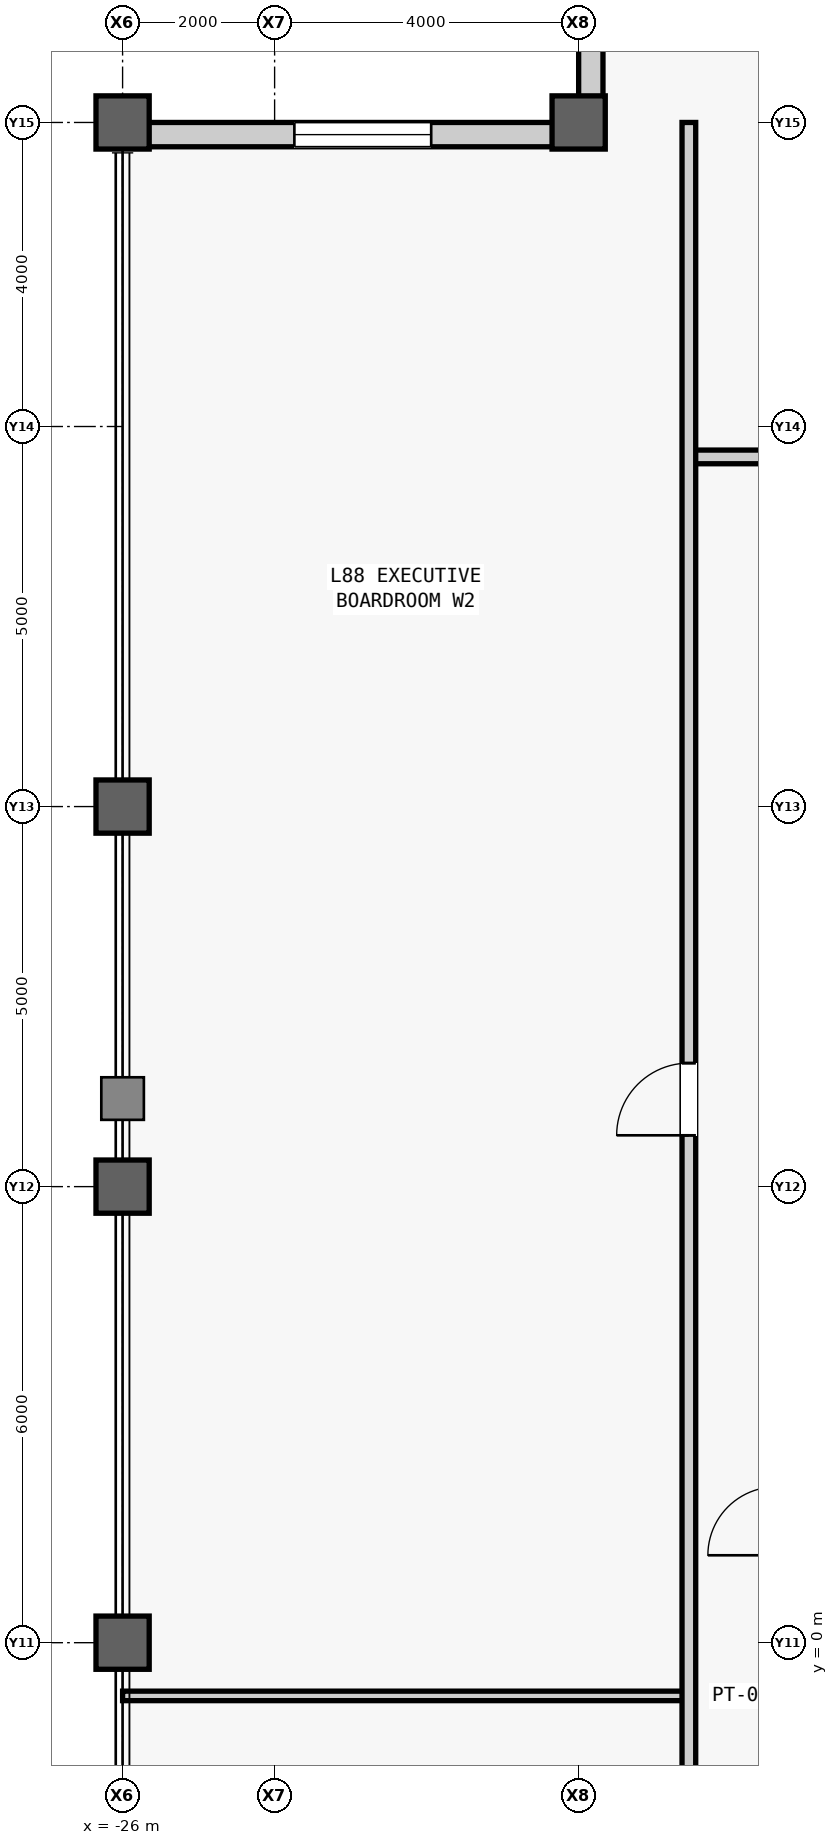
"""IFC4 building model, lengths in metres.
Left out: names, types, materials, properties, quantities, classifications, styles, units other than length and angle.
Written with IfcOpenShell. Run it as: python <this file> out.ifc"""

import sys

from ifc_helpers import new_model, si_unit, direction, frame, frame_2d, origin, origin_2d, place, context, subcontext, project, spatial, rectangle, hollow_rectangle, extrude, source, transform, mapped, element, fill, save


model = new_model("IFC4")
c1 = context("Model", 3, precision=1e-05, world=origin(), true_north=direction((0.0, 1.0)))
c2 = subcontext(c1, "Body", "Model", "MODEL_VIEW")
j1 = project(units=[si_unit("LENGTHUNIT", "METRE"), si_unit("PLANEANGLEUNIT", "RADIAN")], contexts=[c1])
p1 = place(None, origin())
s1 = spatial("IfcSite", under=j1, at=p1, CompositionType="ELEMENT")
p2 = place(p1, origin())
s2 = spatial("IfcBuilding", under=s1, at=p2, CompositionType="ELEMENT")
p3 = place(p2, frame((0.0, 0.0, 370.3)))
s3 = spatial("IfcBuildingStorey", under=s2, at=p3, CompositionType="ELEMENT", Elevation=370.3)
m1 = source(origin(), c2, "Body", "SweptSolid", [
    extrude(hollow_rectangle(XDim=0.7, YDim=0.7, WallThickness=0.04, at=origin_2d()), origin(), (0.0, 0.0, 1.0), 5.2),
])
for number, where, z_axis, x_axis in (
    (1, (-26.0, 0.0, 0.0), (0.0, 0.0, 1.0), (1.0, 0.0, 0.0)),
    (2, (-26.0, 6.0, 0.0), (0.0, 0.0, 1.0), (1.0, 0.0, 0.0)),
    (3, (-26.0, 11.0, 0.0), (0.0, 0.0, 1.0), (1.0, 0.0, 0.0)),
    (4, (-26.0, 20.0, 0.0), (0.0, 0.0, 1.0), (1.0, 0.0, 0.0)),
    (5, (-20.0, 20.0, 0.0), (0.0, 0.0, 1.0), (1.0, 0.0, 0.0)),
):
    element("IfcColumn", number, at=place(p3, frame(where, z_axis=z_axis, x_axis=x_axis)), inside=s3, PredefinedType="COLUMN", context=c2, shape_type="MappedRepresentation", body=[
        mapped(m1, transform((0.0, 0.0, 0.0), scale=1.0)),
    ])
m2 = source(origin(), c2, "Body", "SweptSolid", [
    extrude(rectangle(XDim=5.68, YDim=0.32, at=frame_2d((2.84, 0.0))), origin(), (0.0, 0.0, 1.0), 4.051),
])
p4 = place(p3, frame((-19.84, 20.0, 0.0), z_axis=(0.0, 0.0, 1.0), x_axis=(0.0, 1.0, 0.0)))
e6 = element("IfcWall", 6, at=p4, inside=s3, PredefinedType="STANDARD", context=c2, shape_type="MappedRepresentation", body=[
    mapped(m2, transform((0.0, 0.0, 0.0), scale=1.0)),
])
m3 = source(origin(), c2, "Body", "SweptSolid", [
    extrude(rectangle(XDim=1.8, YDim=2.4, at=frame_2d((0.9, 1.2))), frame((0.0, 0.17, 0.0), z_axis=(0.0, -1.0, 0.0), x_axis=(1.0, 0.0, 0.0)), (0.0, 0.0, 1.0), 0.34),
])
p5 = place(p4, frame((1.94, 0.0, 0.7)))
e7 = element("IfcOpeningElement", 7, at=p5, cuts=e6, PredefinedType="OPENING", context=c2, shape_type="MappedRepresentation", body=[
    mapped(m3, transform((0.0, 0.0, 0.0), scale=1.0)),
])
p6 = place(p3, frame((-20.0, 19.84, 0.0), z_axis=(0.0, 0.0, 1.0), x_axis=(-1.0, 0.0, 0.0)))
e8 = element("IfcWall", 8, at=p6, inside=s3, PredefinedType="STANDARD", context=c2, shape_type="MappedRepresentation", body=[
    mapped(m2, transform((0.0, 0.0, 0.0), scale=1.0)),
])
p7 = place(p6, frame((1.94, 0.0, 0.7)))
e9 = element("IfcOpeningElement", 9, at=p7, cuts=e8, PredefinedType="OPENING", context=c2, shape_type="MappedRepresentation", body=[
    mapped(m3, transform((0.0, 0.0, 0.0), scale=1.0)),
])
m4 = source(origin(), c2, "Body", "SweptSolid", [
    extrude(rectangle(XDim=1.15, YDim=0.18, at=frame_2d((0.575, 0.0))), origin(), (0.0, 0.0, 1.0), 4.6),
])
p8 = place(p3, frame((-18.55, 15.6, 0.0), z_axis=(0.0, 0.0, 1.0), x_axis=(1.0, 0.0, 0.0)))
e10 = element("IfcWall", 10, at=p8, inside=s3, PredefinedType="PARTITIONING", context=c2, shape_type="MappedRepresentation", body=[
    mapped(m4, transform((0.0, 0.0, 0.0), scale=1.0)),
])
m5 = source(origin(), c2, "Body", "SweptSolid", [
    extrude(rectangle(XDim=7.45, YDim=0.125, at=frame_2d((3.725, 0.0))), origin(), (0.0, 0.0, 1.0), 4.6),
])
p9 = place(p3, frame((-26.0, -0.7, 0.0), z_axis=(0.0, 0.0, 1.0), x_axis=(1.0, 0.0, 0.0)))
e11 = element("IfcWall", 11, at=p9, inside=s3, PredefinedType="PARTITIONING", context=c2, shape_type="MappedRepresentation", body=[
    mapped(m5, transform((0.0, 0.0, 0.0), scale=1.0)),
])
m6 = source(origin(), c2, "Body", "SweptSolid", [
    extrude(rectangle(XDim=39.4, YDim=0.18, at=frame_2d((19.7, 0.0))), origin(), (0.0, 0.0, 1.0), 4.6),
])
p10 = place(p3, frame((-18.55, -19.4, 0.0), z_axis=(0.0, 0.0, 1.0), x_axis=(0.0, 1.0, 0.0)))
e12 = element("IfcWall", 12, at=p10, inside=s3, PredefinedType="PARTITIONING", context=c2, shape_type="MappedRepresentation", body=[
    mapped(m6, transform((0.0, 0.0, 0.0), scale=1.0)),
])
m7 = source(origin(), c2, "Body", "SweptSolid", [
    extrude(rectangle(XDim=0.95, YDim=2.15, at=frame_2d((0.475, 1.075))), frame((0.0, 0.1, 0.0), z_axis=(0.0, -1.0, 0.0), x_axis=(1.0, 0.0, 0.0)), (0.0, 0.0, 1.0), 0.2),
])
p11 = place(p10, frame((10.375, 0.0, 0.0)))
e13 = element("IfcOpeningElement", 13, at=p11, cuts=e12, PredefinedType="OPENING", context=c2, shape_type="MappedRepresentation", body=[
    mapped(m7, transform((0.0, 0.0, 0.0), scale=1.0)),
])
p12 = place(p10, frame((26.075, 0.0, 0.0)))
e14 = element("IfcOpeningElement", 14, at=p12, cuts=e12, PredefinedType="OPENING", context=c2, shape_type="MappedRepresentation", body=[
    mapped(m7, transform((0.0, 0.0, 0.0), scale=1.0)),
])
m8 = source(origin(), c2, "Body", "SweptSolid", [
    extrude(rectangle(XDim=1.8, YDim=2.4, at=frame_2d((0.9, 1.2))), frame((0.0, 0.03, 0.0), z_axis=(0.0, -1.0, 0.0), x_axis=(1.0, 0.0, 0.0)), (0.0, 0.0, 1.0), 0.06),
])
p13 = place(p7, origin())
e15 = element("IfcWindow", 15, at=p13, inside=s3, PartitioningType="SINGLE_PANEL", PredefinedType="WINDOW", context=c2, shape_type="MappedRepresentation", body=[
    mapped(m8, transform((0.0, 0.0, 0.0), scale=1.0)),
])
fill(e9, e15)
m9 = source(origin(), c2, "Body", "SweptSolid", [
    extrude(rectangle(XDim=0.95, YDim=2.15, at=frame_2d((0.475, 1.075))), frame((0.0, 0.025, 0.0), z_axis=(0.0, -1.0, 0.0), x_axis=(1.0, 0.0, 0.0)), (0.0, 0.0, 1.0), 0.05),
])
p14 = place(p12, origin())
e16 = element("IfcDoor", 16, at=p14, inside=s3, OperationType="SINGLE_SWING_LEFT", PredefinedType="DOOR", context=c2, shape_type="MappedRepresentation", body=[
    mapped(m9, transform((0.0, 0.0, 0.0), scale=1.0)),
])
fill(e14, e16)
save(model, sys.argv[1])
